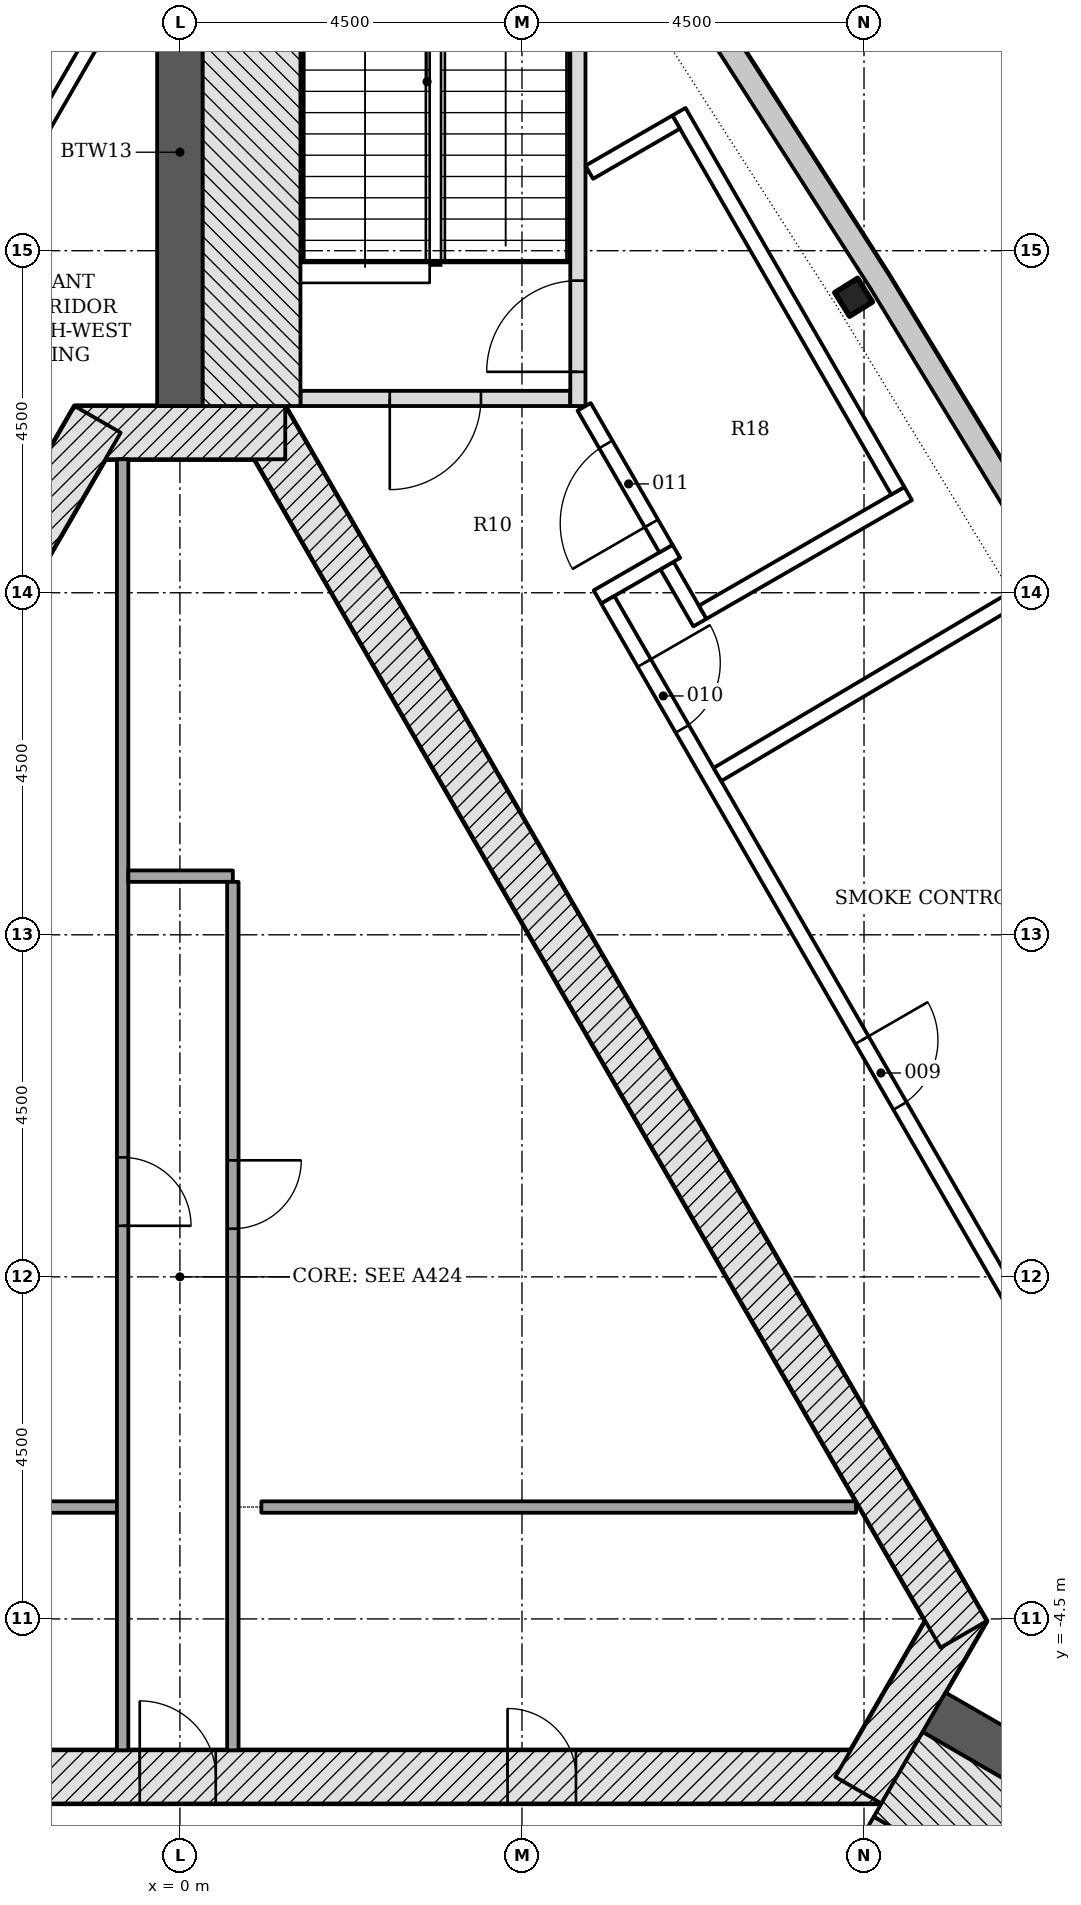
"""IFC4 building model, lengths in metres.
Left out: names, types, materials, properties, quantities, classifications, styles, units other than length and angle.
Written with IfcOpenShell. Run it as: python <this file> out.ifc"""

import sys

from ifc_helpers import new_model, si_unit, direction, frame, frame_2d, origin, origin_2d, place, context, subcontext, project, spatial, polyline, rectangle, i_section, outline, extrude, element, fill, save


model = new_model("IFC4")
c1 = context("Model", 3, precision=1e-05, world=origin(), true_north=direction((0.0, 1.0)))
c2 = subcontext(c1, "Body", "Model", "MODEL_VIEW")
j1 = project(units=[si_unit("LENGTHUNIT", "METRE"), si_unit("PLANEANGLEUNIT", "RADIAN")], contexts=[c1])
p1 = place(None, origin())
s1 = spatial("IfcSite", under=j1, at=p1, CompositionType="ELEMENT")
p2 = place(p1, origin())
s2 = spatial("IfcBuilding", under=s1, at=p2, CompositionType="ELEMENT")
p3 = place(p2, frame((0.0, 0.0, 293.1)))
s3 = spatial("IfcBuildingStorey", under=s2, at=p3, CompositionType="ELEMENT", Elevation=293.1)
p4 = place(p3, frame((-9.229, -6.578, -0.25), z_axis=(0.0, 0.0, 1.0), x_axis=(1.0, 0.0, 0.0)))
e1 = element("IfcWall", 1, at=p4, inside=s3, PredefinedType="SHEAR", context=c2, shape_type="SweptSolid", body=[
    extrude(rectangle(XDim=18.458, YDim=0.7, at=frame_2d((9.229, 0.0))), origin(), (0.0, 0.0, 1.0), 4.5),
])
p5 = place(p4, frame((8.7, 0.0, 0.25)))
e2 = element("IfcOpeningElement", 2, at=p5, cuts=e1, PredefinedType="OPENING", context=c2, shape_type="SweptSolid", body=[
    extrude(rectangle(XDim=1.0, YDim=2.1, at=frame_2d((0.5, 1.05))), frame((0.0, 0.36, 0.0), z_axis=(0.0, -1.0, 0.0), x_axis=(1.0, 0.0, 0.0)), (0.0, 0.0, 1.0), 0.72),
])
p6 = place(p4, frame((3.99, 0.0, 0.25)))
e3 = element("IfcOpeningElement", 3, at=p6, cuts=e1, PredefinedType="OPENING", context=c2, shape_type="SweptSolid", body=[
    extrude(rectangle(XDim=0.9, YDim=2.1, at=frame_2d((0.45, 1.05))), frame((0.0, 0.36, 0.0), z_axis=(0.0, -1.0, 0.0), x_axis=(1.0, 0.0, 0.0)), (0.0, 0.0, 1.0), 0.72),
])
p7 = place(p4, frame((13.539, 0.0, 0.25)))
e4 = element("IfcOpeningElement", 4, at=p7, cuts=e1, PredefinedType="OPENING", context=c2, shape_type="SweptSolid", body=[
    extrude(rectangle(XDim=0.9, YDim=2.1, at=frame_2d((0.45, 1.05))), frame((0.0, 0.36, 0.0), z_axis=(0.0, -1.0, 0.0), x_axis=(1.0, 0.0, 0.0)), (0.0, 0.0, 1.0), 0.72),
])
p8 = place(p3, frame((8.926, -6.753, -0.25), z_axis=(0.0, 0.0, 1.0), x_axis=(0.500042739161, 0.866000726912, 0.0)))
e5 = element("IfcWall", 5, at=p8, inside=s3, PredefinedType="SHEAR", context=c2, shape_type="SweptSolid", body=[
    extrude(rectangle(XDim=2.771, YDim=0.7, at=frame_2d((1.386, 0.0))), origin(), (0.0, 0.0, 1.0), 4.5),
])
p9 = place(p3, frame((10.311, -4.703, -0.25), z_axis=(0.0, 0.0, 1.0), x_axis=(-0.500001446645, 0.866024568562, 0.0)))
e6 = element("IfcWall", 6, at=p9, inside=s3, PredefinedType="SHEAR", context=c2, shape_type="SweptSolid", body=[
    extrude(rectangle(XDim=18.458, YDim=0.7, at=frame_2d((9.229, 0.0))), origin(), (0.0, 0.0, 1.0), 4.5),
])
p10 = place(p3, frame((1.386, 11.106, -0.25), z_axis=(0.0, 0.0, 1.0), x_axis=(-1.0, 0.0, 0.0)))
e7 = element("IfcWall", 7, at=p10, inside=s3, PredefinedType="SHEAR", context=c2, shape_type="SweptSolid", body=[
    extrude(rectangle(XDim=2.771, YDim=0.7, at=frame_2d((1.386, 0.0))), origin(), (0.0, 0.0, 1.0), 4.5),
])
p11 = place(p3, frame((-1.083, 11.281, -0.25), z_axis=(0.0, 0.0, 1.0), x_axis=(-0.500001446645, -0.866024568562, 0.0)))
e8 = element("IfcWall", 8, at=p11, inside=s3, PredefinedType="SHEAR", context=c2, shape_type="SweptSolid", body=[
    extrude(rectangle(XDim=18.458, YDim=0.7, at=frame_2d((9.229, 0.0))), origin(), (0.0, 0.0, 1.0), 4.5),
])
p12 = place(p11, frame((8.979, 0.0, 0.25)))
e9 = element("IfcOpeningElement", 9, at=p12, cuts=e8, PredefinedType="OPENING", context=c2, shape_type="SweptSolid", body=[
    extrude(rectangle(XDim=1.2, YDim=2.1, at=frame_2d((0.6, 1.05))), frame((0.0, 0.36, 0.0), z_axis=(0.0, -1.0, 0.0), x_axis=(1.0, 0.0, 0.0)), (0.0, 0.0, 1.0), 0.72),
])
p13 = place(p11, frame((11.029, 0.0, 0.25)))
e10 = element("IfcOpeningElement", 10, at=p13, cuts=e8, PredefinedType="OPENING", context=c2, shape_type="SweptSolid", body=[
    extrude(rectangle(XDim=1.2, YDim=2.1, at=frame_2d((0.6, 1.05))), frame((0.0, 0.36, 0.0), z_axis=(0.0, -1.0, 0.0), x_axis=(1.0, 0.0, 0.0)), (0.0, 0.0, 1.0), 0.72),
])
p14 = place(p3, frame((0.0, 11.456, -0.25), z_axis=(0.0, 0.0, 1.0), x_axis=(0.0, 1.0, 0.0)))
e11 = element("IfcWall", 11, at=p14, inside=s3, PredefinedType="SHEAR", context=c2, shape_type="SweptSolid", body=[
    extrude(rectangle(XDim=6.679, YDim=0.6, at=frame_2d((3.339, 0.0))), origin(), (0.0, 0.0, 1.0), 4.5),
])
p15 = place(p3, frame((9.922, -5.728, -0.25), z_axis=(0.0, 0.0, 1.0), x_axis=(0.866032176823, -0.499988268569, 0.0)))
e12 = element("IfcWall", 12, at=p15, inside=s3, PredefinedType="SHEAR", context=c2, shape_type="SweptSolid", body=[
    extrude(rectangle(XDim=6.678, YDim=0.6, at=frame_2d((3.339, 0.0))), origin(), (0.0, 0.0, 1.0), 4.5),
])
p16 = place(p3, frame((8.863, 12.888, -0.25), z_axis=(0.0, 0.0, 1.0), x_axis=(-0.529819164802, 0.84811063701, 0.0)))
e13 = element("IfcColumn", 13, at=p16, inside=s3, PredefinedType="COLUMN", context=c2, shape_type="SweptSolid", body=[
    extrude(i_section(OverallWidth=0.368, OverallDepth=0.356, WebThickness=0.011, FlangeThickness=0.018, FilletRadius=0.015, at=origin_2d()), origin(), (0.0, 0.0, 1.0), 4.5),
])
p17 = place(p3, origin())
e14 = element("IfcWall", 14, at=p17, inside=s3, PredefinedType="NOTDEFINED", context=c2, shape_type="SweptSolid", body=[
    extrude(outline(polyline([(11.669, 9.335), (9.33, 13.179), (6.901, 16.968), (6.649, 16.806), (9.075, 13.02), (11.413, 9.179), (11.669, 9.335)])), origin(), (0.0, 0.0, 1.0), 4.25),
])
p18 = place(p3, frame((-8.895, -3.028, 0.0), z_axis=(0.0, 0.0, 1.0), x_axis=(1.0, 0.0, 0.0)))
e15 = element("IfcWall", 15, at=p18, inside=s3, PredefinedType="PARTITIONING", context=c2, shape_type="SweptSolid", body=[
    extrude(rectangle(XDim=8.066, YDim=0.15, at=frame_2d((4.033, 0.0))), origin(), (0.0, 0.0, 1.0), 4.25),
])
p19 = place(p3, frame((-0.754, 10.756, 0.0), z_axis=(0.0, 0.0, 1.0), x_axis=(0.0, -1.0, 0.0)))
e16 = element("IfcWall", 16, at=p19, inside=s3, PredefinedType="PARTITIONING", context=c2, shape_type="SweptSolid", body=[
    extrude(rectangle(XDim=16.985, YDim=0.15, at=frame_2d((8.492, 0.0))), origin(), (0.0, 0.0, 1.0), 4.25),
])
p20 = place(p19, frame((9.185, 0.0, 0.0)))
e17 = element("IfcOpeningElement", 17, at=p20, cuts=e16, PredefinedType="OPENING", context=c2, shape_type="SweptSolid", body=[
    extrude(rectangle(XDim=0.9, YDim=2.1, at=frame_2d((0.45, 1.05))), frame((0.0, 0.085, 0.0), z_axis=(0.0, -1.0, 0.0), x_axis=(1.0, 0.0, 0.0)), (0.0, 0.0, 1.0), 0.17),
])
p21 = place(p3, frame((-0.679, 5.272, 0.0), z_axis=(0.0, 0.0, 1.0), x_axis=(1.0, 0.0, 0.0)))
e18 = element("IfcWall", 18, at=p21, inside=s3, PredefinedType="PARTITIONING", context=c2, shape_type="SweptSolid", body=[
    extrude(rectangle(XDim=1.375, YDim=0.15, at=frame_2d((0.688, 0.0))), origin(), (0.0, 0.0, 1.0), 4.25),
])
p22 = place(p3, frame((0.696, 5.197, 0.0), z_axis=(0.0, 0.0, 1.0), x_axis=(0.0, -1.0, 0.0)))
e19 = element("IfcWall", 19, at=p22, inside=s3, PredefinedType="PARTITIONING", context=c2, shape_type="SweptSolid", body=[
    extrude(rectangle(XDim=11.425, YDim=0.15, at=frame_2d((5.712, 0.0))), origin(), (0.0, 0.0, 1.0), 4.25),
])
p23 = place(p22, frame((3.664, 0.0, 0.0)))
e20 = element("IfcOpeningElement", 20, at=p23, cuts=e19, PredefinedType="OPENING", context=c2, shape_type="SweptSolid", body=[
    extrude(rectangle(XDim=0.9, YDim=2.1, at=frame_2d((0.45, 1.05))), frame((0.0, 0.085, 0.0), z_axis=(0.0, -1.0, 0.0), x_axis=(1.0, 0.0, 0.0)), (0.0, 0.0, 1.0), 0.17),
])
p24 = place(p3, frame((1.071, -3.028, 0.0), z_axis=(0.0, 0.0, 1.0), x_axis=(1.0, 0.0, 0.0)))
e21 = element("IfcWall", 21, at=p24, inside=s3, PredefinedType="PARTITIONING", context=c2, shape_type="SweptSolid", body=[
    extrude(rectangle(XDim=7.824, YDim=0.15, at=frame_2d((3.912, 0.0))), origin(), (0.0, 0.0, 1.0), 4.25),
])
p25 = place(p3, frame((5.135, 11.556, -0.25), z_axis=(0.0, 0.0, 1.0), x_axis=(-1.0, 0.0, 0.0)))
e22 = element("IfcWall", 22, at=p25, inside=s3, PredefinedType="SHEAR", context=c2, shape_type="SweptSolid", body=[
    extrude(rectangle(XDim=3.55, YDim=0.2, at=frame_2d((1.775, 0.0))), origin(), (0.0, 0.0, 1.0), 4.5),
])
p26 = place(p25, frame((1.175, 0.0, 0.25)))
e23 = element("IfcOpeningElement", 23, at=p26, cuts=e22, PredefinedType="OPENING", context=c2, shape_type="SweptSolid", body=[
    extrude(rectangle(XDim=1.2, YDim=2.1, at=frame_2d((0.6, 1.05))), frame((0.0, 0.11, 0.0), z_axis=(0.0, -1.0, 0.0), x_axis=(1.0, 0.0, 0.0)), (0.0, 0.0, 1.0), 0.22),
])
p27 = place(p3, frame((5.236, 11.456, -0.25), z_axis=(0.0, 0.0, 1.0), x_axis=(0.0, 1.0, 0.0)))
e24 = element("IfcWall", 24, at=p27, inside=s3, PredefinedType="SHEAR", context=c2, shape_type="SweptSolid", body=[
    extrude(rectangle(XDim=5.6, YDim=0.2, at=frame_2d((2.8, 0.0))), origin(), (0.0, 0.0, 1.0), 4.5),
])
p28 = place(p27, frame((0.45, 0.0, 0.25)))
e25 = element("IfcOpeningElement", 25, at=p28, cuts=e24, PredefinedType="OPENING", context=c2, shape_type="SweptSolid", body=[
    extrude(rectangle(XDim=1.2, YDim=2.1, at=frame_2d((0.6, 1.05))), frame((0.0, 0.11, 0.0), z_axis=(0.0, -1.0, 0.0), x_axis=(1.0, 0.0, 0.0)), (0.0, 0.0, 1.0), 0.22),
])
p29 = place(p3, frame((0.943, 11.456, -0.25), z_axis=(0.0, 0.0, 1.0), x_axis=(0.0, 1.0, 0.0)))
e26 = element("IfcWall", 26, at=p29, inside=s3, PredefinedType="SHEAR", context=c2, shape_type="SweptSolid", body=[
    extrude(rectangle(XDim=6.679, YDim=1.286, at=frame_2d((3.339, 0.0))), origin(), (0.0, 0.0, 1.0), 4.5),
])
p30 = place(p3, frame((7.44, -10.226, -0.25), z_axis=(0.0, 0.0, 1.0), x_axis=(0.500022077904, 0.866012656725, 0.0)))
e27 = element("IfcWall", 27, at=p30, inside=s3, PredefinedType="SHEAR", context=c2, shape_type="SweptSolid", body=[
    extrude(rectangle(XDim=3.55, YDim=0.2, at=frame_2d((1.775, 0.0))), origin(), (0.0, 0.0, 1.0), 4.5),
])
p31 = place(p30, frame((1.175, 0.0, 0.25)))
e28 = element("IfcOpeningElement", 28, at=p31, cuts=e27, PredefinedType="OPENING", context=c2, shape_type="SweptSolid", body=[
    extrude(rectangle(XDim=1.2, YDim=2.1, at=frame_2d((0.6, 1.05))), frame((0.0, 0.11, 0.0), z_axis=(0.0, -1.0, 0.0), x_axis=(1.0, 0.0, 0.0)), (0.0, 0.0, 1.0), 0.22),
])
p32 = place(p3, frame((9.45, -6.545, -0.25), z_axis=(0.0, 0.0, 1.0), x_axis=(0.866016347338, -0.500015685897, 0.0)))
e29 = element("IfcWall", 29, at=p32, inside=s3, PredefinedType="SHEAR", context=c2, shape_type="SweptSolid", body=[
    extrude(rectangle(XDim=6.678, YDim=1.286, at=frame_2d((3.339, 0.0))), origin(), (0.0, 0.0, 1.0), 4.5),
])
p33 = place(p3, frame((-0.387, 17.587, 0.0), z_axis=(0.0, 0.0, 1.0), x_axis=(-0.499990582914, -0.866030840673, 0.0)))
e30 = element("IfcWall", 30, at=p33, inside=s3, PredefinedType="PARTITIONING", context=c2, shape_type="SweptSolid", body=[
    extrude(rectangle(XDim=14.187, YDim=0.2, at=frame_2d((7.094, 0.0))), origin(), (0.0, 0.0, 1.0), 3.702),
])
p34 = place(p33, frame((6.455, 0.0, 0.0)))
e31 = element("IfcOpeningElement", 31, at=p34, cuts=e30, PredefinedType="OPENING", context=c2, shape_type="SweptSolid", body=[
    extrude(rectangle(XDim=1.0, YDim=2.1, at=frame_2d((0.5, 1.05))), frame((0.0, 0.11, 0.0), z_axis=(0.0, -1.0, 0.0), x_axis=(1.0, 0.0, 0.0)), (0.0, 0.0, 1.0), 0.22),
])
p35 = place(p3, frame((6.408, 9.358, 0.0), z_axis=(0.0, 0.0, 1.0), x_axis=(0.499958279983, -0.866049489508, 0.0)))
e32 = element("IfcWall", 32, at=p35, inside=s3, PredefinedType="PARTITIONING", context=c2, shape_type="SweptSolid", body=[
    extrude(rectangle(XDim=0.866, YDim=0.2, at=frame_2d((0.433, 0.0))), origin(), (0.0, 0.0, 1.0), 4.25),
])
p36 = place(p3, frame((5.494, 8.945, 0.0), z_axis=(0.0, 0.0, 1.0), x_axis=(0.866039638822, 0.499975343382, 0.0)))
e33 = element("IfcWall", 33, at=p36, inside=s3, PredefinedType="PARTITIONING", context=c2, shape_type="SweptSolid", body=[
    extrude(rectangle(XDim=1.198, YDim=0.2, at=frame_2d((0.599, 0.0))), origin(), (0.0, 0.0, 1.0), 4.25),
])
p37 = place(p3, frame((6.395, 9.581, 0.0), z_axis=(0.0, 0.0, 1.0), x_axis=(-0.500003735859, 0.866023246874, 0.0)))
e34 = element("IfcWall", 34, at=p37, inside=s3, PredefinedType="PARTITIONING", context=c2, shape_type="SweptSolid", body=[
    extrude(rectangle(XDim=2.154, YDim=0.2, at=frame_2d((1.077, 0.0))), origin(), (0.0, 0.0, 1.0), 3.702),
])
p38 = place(p37, frame((0.383, 0.0, 0.0)))
e35 = element("IfcOpeningElement", 35, at=p38, cuts=e34, PredefinedType="OPENING", context=c2, shape_type="SweptSolid", body=[
    extrude(rectangle(XDim=1.2, YDim=2.1, at=frame_2d((0.6, 1.05))), frame((0.0, 0.11, 0.0), z_axis=(0.0, -1.0, 0.0), x_axis=(1.0, 0.0, 0.0)), (0.0, 0.0, 1.0), 0.22),
])
p39 = place(p3, frame((5.628, 8.908, 0.0), z_axis=(0.0, 0.0, 1.0), x_axis=(0.500003229304, -0.866023539337, 0.0)))
e36 = element("IfcWall", 36, at=p39, inside=s3, PredefinedType="PARTITIONING", context=c2, shape_type="SweptSolid", body=[
    extrude(rectangle(XDim=20.297, YDim=0.2, at=frame_2d((10.148, 0.0))), origin(), (0.0, 0.0, 1.0), 3.702),
])
p40 = place(p39, frame((15.459, 0.0, 0.0)))
e37 = element("IfcOpeningElement", 37, at=p40, cuts=e36, PredefinedType="OPENING", context=c2, shape_type="SweptSolid", body=[
    extrude(rectangle(XDim=1.0, YDim=2.1, at=frame_2d((0.5, 1.05))), frame((0.0, 0.11, 0.0), z_axis=(0.0, -1.0, 0.0), x_axis=(1.0, 0.0, 0.0)), (0.0, 0.0, 1.0), 0.22),
])
p41 = place(p39, frame((6.689, 0.0, 0.0)))
e38 = element("IfcOpeningElement", 38, at=p41, cuts=e36, PredefinedType="OPENING", context=c2, shape_type="SweptSolid", body=[
    extrude(rectangle(XDim=1.0, YDim=2.1, at=frame_2d((0.5, 1.05))), frame((0.0, 0.11, 0.0), z_axis=(0.0, -1.0, 0.0), x_axis=(1.0, 0.0, 0.0)), (0.0, 0.0, 1.0), 0.22),
])
p42 = place(p39, frame((0.961, 0.0, 0.0)))
e39 = element("IfcOpeningElement", 39, at=p42, cuts=e36, PredefinedType="OPENING", context=c2, shape_type="SweptSolid", body=[
    extrude(rectangle(XDim=1.0, YDim=2.1, at=frame_2d((0.5, 1.05))), frame((0.0, 0.11, 0.0), z_axis=(0.0, -1.0, 0.0), x_axis=(1.0, 0.0, 0.0)), (0.0, 0.0, 1.0), 0.22),
])
p43 = place(p3, frame((7.072, 6.61, 0.0), z_axis=(0.0, 0.0, 1.0), x_axis=(0.860180512155, 0.509989692552, 0.0)))
e40 = element("IfcWall", 40, at=p43, inside=s3, PredefinedType="PARTITIONING", context=c2, shape_type="SweptSolid", body=[
    extrude(rectangle(XDim=4.645, YDim=0.2, at=frame_2d((2.322, 0.0))), origin(), (0.0, 0.0, 1.0), 3.702),
])
p44 = place(p3, frame((6.878, 8.744, 0.0), z_axis=(0.0, 0.0, 1.0), x_axis=(0.866025387892, 0.500000027526, 0.0)))
e41 = element("IfcWall", 41, at=p44, inside=s3, PredefinedType="PARTITIONING", context=c2, shape_type="SweptSolid", body=[
    extrude(rectangle(XDim=3.122, YDim=0.2, at=frame_2d((1.561, 0.0))), origin(), (0.0, 0.0, 1.0), 4.25),
])
p45 = place(p3, frame((9.445, 10.341, 0.0), z_axis=(0.0, 0.0, 1.0), x_axis=(-0.499996461177, 0.866027446915, 0.0)))
e42 = element("IfcWall", 42, at=p45, inside=s3, PredefinedType="PARTITIONING", context=c2, shape_type="SweptSolid", body=[
    extrude(rectangle(XDim=5.759, YDim=0.2, at=frame_2d((2.879, 0.0))), origin(), (0.0, 0.0, 1.0), 3.702),
])
p46 = place(p3, frame((6.529, 15.192, 0.0), z_axis=(0.0, 0.0, 1.0), x_axis=(-0.866117824122, -0.499839889103, 0.0)))
e43 = element("IfcWall", 43, at=p46, inside=s3, PredefinedType="PARTITIONING", context=c2, shape_type="SweptSolid", body=[
    extrude(rectangle(XDim=1.32, YDim=0.2, at=frame_2d((0.66, 0.0))), origin(), (0.0, 0.0, 1.0), 4.25),
])
p47 = place(p5, origin())
e44 = element("IfcDoor", 44, at=p47, inside=s3, OperationType="SINGLE_SWING_LEFT", PredefinedType="DOOR", context=c2, shape_type="SweptSolid", body=[
    extrude(rectangle(XDim=1.0, YDim=2.1, at=frame_2d((0.5, 1.05))), frame((0.0, 0.075, 0.0), z_axis=(0.0, -1.0, 0.0), x_axis=(1.0, 0.0, 0.0)), (0.0, 0.0, 1.0), 0.15),
])
fill(e2, e44)
p48 = place(p7, origin())
e45 = element("IfcDoor", 45, at=p48, inside=s3, OperationType="SINGLE_SWING_LEFT", PredefinedType="DOOR", context=c2, shape_type="SweptSolid", body=[
    extrude(rectangle(XDim=0.9, YDim=2.1, at=frame_2d((0.45, 1.05))), frame((0.0, 0.075, 0.0), z_axis=(0.0, -1.0, 0.0), x_axis=(1.0, 0.0, 0.0)), (0.0, 0.0, 1.0), 0.15),
])
fill(e4, e45)
p49 = place(p20, origin())
e46 = element("IfcDoor", 46, at=p49, inside=s3, OperationType="SINGLE_SWING_RIGHT", PredefinedType="DOOR", context=c2, shape_type="SweptSolid", body=[
    extrude(rectangle(XDim=0.9, YDim=2.1, at=frame_2d((0.45, 1.05))), frame((0.0, 0.025, 0.0), z_axis=(0.0, -1.0, 0.0), x_axis=(1.0, 0.0, 0.0)), (0.0, 0.0, 1.0), 0.05),
])
fill(e17, e46)
p50 = place(p23, origin())
e47 = element("IfcDoor", 47, at=p50, inside=s3, OperationType="SINGLE_SWING_LEFT", PredefinedType="DOOR", context=c2, shape_type="SweptSolid", body=[
    extrude(rectangle(XDim=0.9, YDim=2.1, at=frame_2d((0.45, 1.05))), frame((0.0, 0.025, 0.0), z_axis=(0.0, -1.0, 0.0), x_axis=(1.0, 0.0, 0.0)), (0.0, 0.0, 1.0), 0.05),
])
fill(e20, e47)
p51 = place(p26, origin())
e48 = element("IfcDoor", 48, at=p51, inside=s3, OperationType="SINGLE_SWING_RIGHT", PredefinedType="DOOR", context=c2, shape_type="SweptSolid", body=[
    extrude(rectangle(XDim=1.2, YDim=2.1, at=frame_2d((0.6, 1.05))), frame((0.0, 0.025, 0.0), z_axis=(0.0, -1.0, 0.0), x_axis=(1.0, 0.0, 0.0)), (0.0, 0.0, 1.0), 0.05),
])
fill(e23, e48)
p52 = place(p28, origin())
e49 = element("IfcDoor", 49, at=p52, inside=s3, OperationType="SINGLE_SWING_LEFT", PredefinedType="DOOR", context=c2, shape_type="SweptSolid", body=[
    extrude(rectangle(XDim=1.2, YDim=2.1, at=frame_2d((0.6, 1.05))), frame((0.0, 0.025, 0.0), z_axis=(0.0, -1.0, 0.0), x_axis=(1.0, 0.0, 0.0)), (0.0, 0.0, 1.0), 0.05),
])
fill(e25, e49)
p53 = place(p41, origin())
e50 = element("IfcDoor", 50, at=p53, inside=s3, OperationType="SINGLE_SWING_LEFT", PredefinedType="DOOR", context=c2, shape_type="SweptSolid", body=[
    extrude(rectangle(XDim=1.0, YDim=2.1, at=frame_2d((0.5, 1.05))), frame((0.0, 0.025, 0.0), z_axis=(0.0, -1.0, 0.0), x_axis=(1.0, 0.0, 0.0)), (0.0, 0.0, 1.0), 0.05),
])
fill(e38, e50)
p54 = place(p42, origin())
e51 = element("IfcDoor", 51, at=p54, inside=s3, OperationType="SINGLE_SWING_LEFT", PredefinedType="DOOR", context=c2, shape_type="SweptSolid", body=[
    extrude(rectangle(XDim=1.0, YDim=2.1, at=frame_2d((0.5, 1.05))), frame((0.0, 0.025, 0.0), z_axis=(0.0, -1.0, 0.0), x_axis=(1.0, 0.0, 0.0)), (0.0, 0.0, 1.0), 0.05),
])
fill(e39, e51)
p55 = place(p38, origin())
e52 = element("IfcDoor", 52, at=p55, inside=s3, OperationType="SINGLE_SWING_LEFT", PredefinedType="DOOR", context=c2, shape_type="SweptSolid", body=[
    extrude(rectangle(XDim=1.2, YDim=2.1, at=frame_2d((0.6, 1.05))), frame((0.0, 0.025, 0.0), z_axis=(0.0, -1.0, 0.0), x_axis=(1.0, 0.0, 0.0)), (0.0, 0.0, 1.0), 0.05),
])
fill(e35, e52)
save(model, sys.argv[1])
